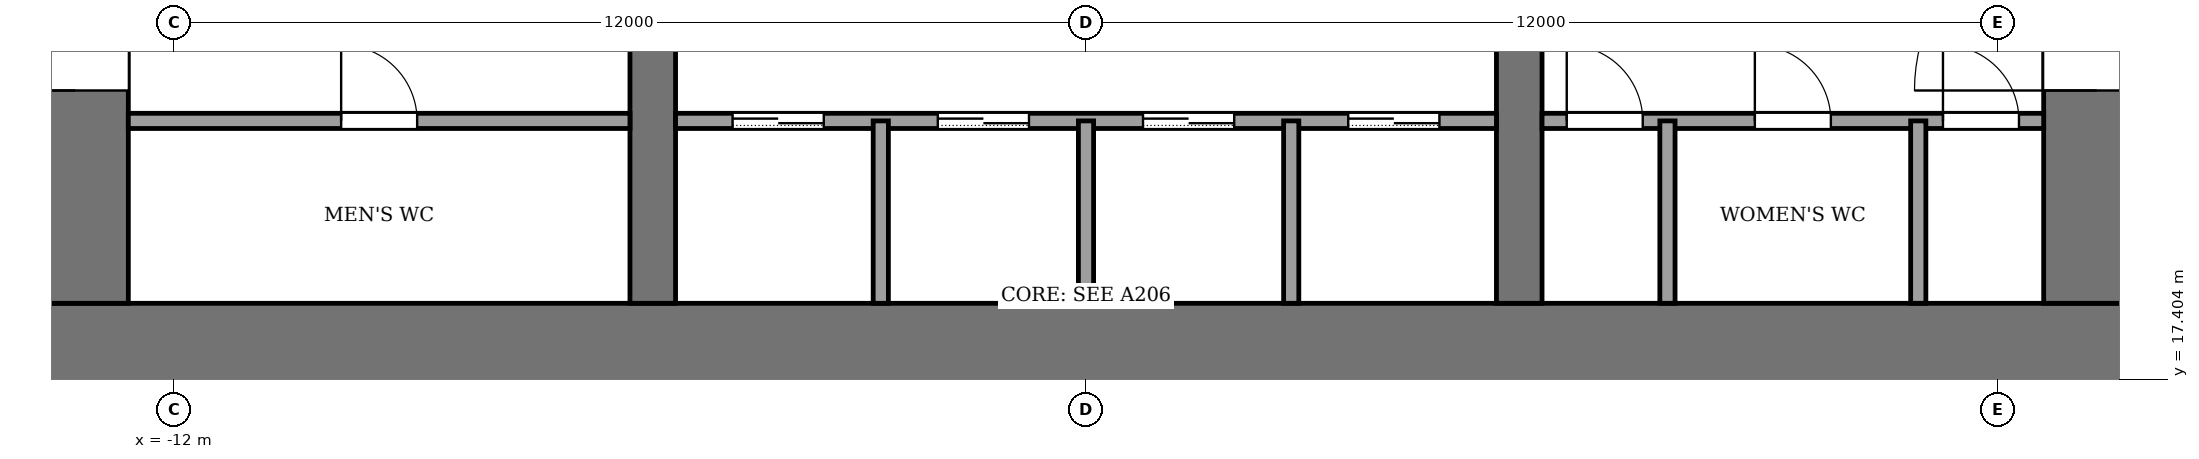
"""IFC4 building model, lengths in metres.
Left out: names, types, materials, properties, quantities, classifications, styles, units other than length and angle.
Written with IfcOpenShell. Run it as: python <this file> out.ifc"""

import sys

from ifc_helpers import new_model, si_unit, direction, frame, frame_2d, origin, place, context, subcontext, project, spatial, rectangle, extrude, element, fill, save


model = new_model("IFC4")
c1 = context("Model", 3, precision=1e-05, world=origin(), true_north=direction((0.0, 1.0)))
c2 = subcontext(c1, "Body", "Model", "MODEL_VIEW")
j1 = project(units=[si_unit("LENGTHUNIT", "METRE"), si_unit("PLANEANGLEUNIT", "RADIAN")], contexts=[c1])
p1 = place(None, origin())
s1 = spatial("IfcSite", under=j1, at=p1, CompositionType="ELEMENT")
p2 = place(p1, origin())
s2 = spatial("IfcBuilding", under=s1, at=p2, CompositionType="ELEMENT")
p3 = place(p2, frame((0.0, 0.0, 26.0)))
s3 = spatial("IfcBuildingStorey", under=s2, at=p3, CompositionType="ELEMENT", Elevation=26.0)
p4 = place(p3, frame((-14.0, 17.7, -0.13), z_axis=(0.0, 0.0, 1.0), x_axis=(1.0, 0.0, 0.0)))
e1 = element("IfcWall", 1, at=p4, inside=s3, PredefinedType="SHEAR", context=c2, shape_type="SweptSolid", body=[
    extrude(rectangle(XDim=28.0, YDim=1.4, at=frame_2d((14.0, 0.0))), origin(), (0.0, 0.0, 1.0), 4.0),
])
p5 = place(p3, frame((-13.3, 18.4, -0.13), z_axis=(0.0, 0.0, 1.0), x_axis=(0.0, 1.0, 0.0)))
e2 = element("IfcWall", 2, at=p5, inside=s3, PredefinedType="SHEAR", context=c2, shape_type="SweptSolid", body=[
    extrude(rectangle(XDim=19.2, YDim=1.4, at=frame_2d((9.6, 0.0))), origin(), (0.0, 0.0, 1.0), 4.0),
])
p6 = place(p5, frame((2.8, 0.0, 0.13)))
e3 = element("IfcOpeningElement", 3, at=p6, cuts=e2, PredefinedType="OPENING", context=c2, shape_type="SweptSolid", body=[
    extrude(rectangle(XDim=2.4, YDim=2.4, at=frame_2d((1.2, 1.2))), frame((0.0, 0.71, 0.0), z_axis=(0.0, -1.0, 0.0), x_axis=(1.0, 0.0, 0.0)), (0.0, 0.0, 1.0), 1.42),
])
p7 = place(p5, frame((13.4, 0.0, 0.13)))
e4 = element("IfcOpeningElement", 4, at=p7, cuts=e2, PredefinedType="OPENING", context=c2, shape_type="SweptSolid", body=[
    extrude(rectangle(XDim=1.4, YDim=2.2, at=frame_2d((0.7, 1.1))), frame((0.0, 0.71, 0.0), z_axis=(0.0, -1.0, 0.0), x_axis=(1.0, 0.0, 0.0)), (0.0, 0.0, 1.0), 1.42),
])
p8 = place(p3, frame((13.3, 18.4, -0.13), z_axis=(0.0, 0.0, 1.0), x_axis=(0.0, 1.0, 0.0)))
e5 = element("IfcWall", 5, at=p8, inside=s3, PredefinedType="SHEAR", context=c2, shape_type="SweptSolid", body=[
    extrude(rectangle(XDim=19.2, YDim=1.4, at=frame_2d((9.6, 0.0))), origin(), (0.0, 0.0, 1.0), 4.0),
])
p9 = place(p8, frame((2.8, 0.0, 0.13)))
e6 = element("IfcOpeningElement", 6, at=p9, cuts=e5, PredefinedType="OPENING", context=c2, shape_type="SweptSolid", body=[
    extrude(rectangle(XDim=2.4, YDim=2.4, at=frame_2d((1.2, 1.2))), frame((0.0, 0.71, 0.0), z_axis=(0.0, -1.0, 0.0), x_axis=(1.0, 0.0, 0.0)), (0.0, 0.0, 1.0), 1.42),
])
p10 = place(p8, frame((13.3, 0.0, 0.13)))
e7 = element("IfcOpeningElement", 7, at=p10, cuts=e5, PredefinedType="OPENING", context=c2, shape_type="SweptSolid", body=[
    extrude(rectangle(XDim=2.4, YDim=2.4, at=frame_2d((1.2, 1.2))), frame((0.0, 0.71, 0.0), z_axis=(0.0, -1.0, 0.0), x_axis=(1.0, 0.0, 0.0)), (0.0, 0.0, 1.0), 1.42),
])
p11 = place(p3, frame((-5.7, 18.4, -0.13), z_axis=(0.0, 0.0, 1.0), x_axis=(0.0, 1.0, 0.0)))
e8 = element("IfcWall", 8, at=p11, inside=s3, PredefinedType="SHEAR", context=c2, shape_type="SweptSolid", body=[
    extrude(rectangle(XDim=19.2, YDim=0.6, at=frame_2d((9.6, 0.0))), origin(), (0.0, 0.0, 1.0), 4.0),
])
p12 = place(p11, frame((8.35, 0.0, 0.13)))
e9 = element("IfcOpeningElement", 9, at=p12, cuts=e8, PredefinedType="OPENING", context=c2, shape_type="SweptSolid", body=[
    extrude(rectangle(XDim=0.9, YDim=2.1, at=frame_2d((0.45, 1.05))), frame((0.0, 0.31, 0.0), z_axis=(0.0, -1.0, 0.0), x_axis=(1.0, 0.0, 0.0)), (0.0, 0.0, 1.0), 0.62),
])
p13 = place(p3, frame((5.7, 18.4, -0.13), z_axis=(0.0, 0.0, 1.0), x_axis=(0.0, 1.0, 0.0)))
e10 = element("IfcWall", 10, at=p13, inside=s3, PredefinedType="SHEAR", context=c2, shape_type="SweptSolid", body=[
    extrude(rectangle(XDim=19.2, YDim=0.6, at=frame_2d((9.6, 0.0))), origin(), (0.0, 0.0, 1.0), 4.0),
])
p14 = place(p13, frame((13.3, 0.0, 0.13)))
e11 = element("IfcOpeningElement", 11, at=p14, cuts=e10, PredefinedType="OPENING", context=c2, shape_type="SweptSolid", body=[
    extrude(rectangle(XDim=2.4, YDim=2.4, at=frame_2d((1.2, 1.2))), frame((0.0, 0.31, 0.0), z_axis=(0.0, -1.0, 0.0), x_axis=(1.0, 0.0, 0.0)), (0.0, 0.0, 1.0), 0.62),
])
p15 = place(p3, frame((-12.6, 20.8, 0.0), z_axis=(0.0, 0.0, 1.0), x_axis=(1.0, 0.0, 0.0)))
e12 = element("IfcWall", 12, at=p15, inside=s3, PredefinedType="PARTITIONING", context=c2, shape_type="SweptSolid", body=[
    extrude(rectangle(XDim=6.6, YDim=0.2, at=frame_2d((3.3, 0.0))), origin(), (0.0, 0.0, 1.0), 3.87),
])
p16 = place(p15, frame((2.8, 0.0, 0.0)))
e13 = element("IfcOpeningElement", 13, at=p16, cuts=e12, PredefinedType="OPENING", context=c2, shape_type="SweptSolid", body=[
    extrude(rectangle(XDim=1.0, YDim=2.1, at=frame_2d((0.5, 1.05))), frame((0.0, 0.11, 0.0), z_axis=(0.0, -1.0, 0.0), x_axis=(1.0, 0.0, 0.0)), (0.0, 0.0, 1.0), 0.22),
])
p17 = place(p3, frame((-5.4, 20.8, 0.0), z_axis=(0.0, 0.0, 1.0), x_axis=(1.0, 0.0, 0.0)))
e14 = element("IfcWall", 14, at=p17, inside=s3, PredefinedType="PARTITIONING", context=c2, shape_type="SweptSolid", body=[
    extrude(rectangle(XDim=10.8, YDim=0.2, at=frame_2d((5.4, 0.0))), origin(), (0.0, 0.0, 1.0), 3.87),
])
p18 = place(p17, frame((0.75, 0.0, 0.0)))
e15 = element("IfcOpeningElement", 15, at=p18, cuts=e14, PredefinedType="OPENING", context=c2, shape_type="SweptSolid", body=[
    extrude(rectangle(XDim=1.2, YDim=2.2, at=frame_2d((0.6, 1.1))), frame((0.0, 0.11, 0.0), z_axis=(0.0, -1.0, 0.0), x_axis=(1.0, 0.0, 0.0)), (0.0, 0.0, 1.0), 0.22),
])
p19 = place(p17, frame((3.45, 0.0, 0.0)))
e16 = element("IfcOpeningElement", 16, at=p19, cuts=e14, PredefinedType="OPENING", context=c2, shape_type="SweptSolid", body=[
    extrude(rectangle(XDim=1.2, YDim=2.2, at=frame_2d((0.6, 1.1))), frame((0.0, 0.11, 0.0), z_axis=(0.0, -1.0, 0.0), x_axis=(1.0, 0.0, 0.0)), (0.0, 0.0, 1.0), 0.22),
])
p20 = place(p17, frame((6.15, 0.0, 0.0)))
e17 = element("IfcOpeningElement", 17, at=p20, cuts=e14, PredefinedType="OPENING", context=c2, shape_type="SweptSolid", body=[
    extrude(rectangle(XDim=1.2, YDim=2.2, at=frame_2d((0.6, 1.1))), frame((0.0, 0.11, 0.0), z_axis=(0.0, -1.0, 0.0), x_axis=(1.0, 0.0, 0.0)), (0.0, 0.0, 1.0), 0.22),
])
p21 = place(p17, frame((8.85, 0.0, 0.0)))
e18 = element("IfcOpeningElement", 18, at=p21, cuts=e14, PredefinedType="OPENING", context=c2, shape_type="SweptSolid", body=[
    extrude(rectangle(XDim=1.2, YDim=2.2, at=frame_2d((0.6, 1.1))), frame((0.0, 0.11, 0.0), z_axis=(0.0, -1.0, 0.0), x_axis=(1.0, 0.0, 0.0)), (0.0, 0.0, 1.0), 0.22),
])
p22 = place(p3, frame((6.0, 20.8, 0.0), z_axis=(0.0, 0.0, 1.0), x_axis=(1.0, 0.0, 0.0)))
e19 = element("IfcWall", 19, at=p22, inside=s3, PredefinedType="PARTITIONING", context=c2, shape_type="SweptSolid", body=[
    extrude(rectangle(XDim=6.6, YDim=0.2, at=frame_2d((3.3, 0.0))), origin(), (0.0, 0.0, 1.0), 3.87),
])
p23 = place(p22, frame((0.325, 0.0, 0.0)))
e20 = element("IfcOpeningElement", 20, at=p23, cuts=e19, PredefinedType="OPENING", context=c2, shape_type="SweptSolid", body=[
    extrude(rectangle(XDim=1.0, YDim=2.1, at=frame_2d((0.5, 1.05))), frame((0.0, 0.11, 0.0), z_axis=(0.0, -1.0, 0.0), x_axis=(1.0, 0.0, 0.0)), (0.0, 0.0, 1.0), 0.22),
])
p24 = place(p22, frame((2.8, 0.0, 0.0)))
e21 = element("IfcOpeningElement", 21, at=p24, cuts=e19, PredefinedType="OPENING", context=c2, shape_type="SweptSolid", body=[
    extrude(rectangle(XDim=1.0, YDim=2.1, at=frame_2d((0.5, 1.05))), frame((0.0, 0.11, 0.0), z_axis=(0.0, -1.0, 0.0), x_axis=(1.0, 0.0, 0.0)), (0.0, 0.0, 1.0), 0.22),
])
p25 = place(p22, frame((5.275, 0.0, 0.0)))
e22 = element("IfcOpeningElement", 22, at=p25, cuts=e19, PredefinedType="OPENING", context=c2, shape_type="SweptSolid", body=[
    extrude(rectangle(XDim=1.0, YDim=2.1, at=frame_2d((0.5, 1.05))), frame((0.0, 0.11, 0.0), z_axis=(0.0, -1.0, 0.0), x_axis=(1.0, 0.0, 0.0)), (0.0, 0.0, 1.0), 0.22),
])
for number, where, z_axis, x_axis in (
    (23, (-2.7, 18.4, 0.0), (0.0, 0.0, 1.0), (0.0, 1.0, 0.0)),
    (24, (0.0, 18.4, 0.0), (0.0, 0.0, 1.0), (0.0, 1.0, 0.0)),
    (25, (2.7, 18.4, 0.0), (0.0, 0.0, 1.0), (0.0, 1.0, 0.0)),
    (26, (7.65, 18.4, 0.0), (0.0, 0.0, 1.0), (0.0, 1.0, 0.0)),
    (27, (10.95, 18.4, 0.0), (0.0, 0.0, 1.0), (0.0, 1.0, 0.0)),
):
    element("IfcWall", number, at=place(p3, frame(where, z_axis=z_axis, x_axis=x_axis)), inside=s3, PredefinedType="PARTITIONING", context=c2, shape_type="SweptSolid", body=[
        extrude(rectangle(XDim=2.4, YDim=0.2, at=frame_2d((1.2, 0.0))), origin(), (0.0, 0.0, 1.0), 3.87),
    ])
p26 = place(p18, origin())
e28 = element("IfcDoor", 28, at=p26, inside=s3, OperationType="SLIDING_TO_LEFT", PredefinedType="DOOR", context=c2, shape_type="SweptSolid", body=[
    extrude(rectangle(XDim=1.2, YDim=2.2, at=frame_2d((0.6, 1.1))), frame((0.0, 0.025, 0.0), z_axis=(0.0, -1.0, 0.0), x_axis=(1.0, 0.0, 0.0)), (0.0, 0.0, 1.0), 0.05),
])
fill(e15, e28)
p27 = place(p19, origin())
e29 = element("IfcDoor", 29, at=p27, inside=s3, OperationType="SLIDING_TO_LEFT", PredefinedType="DOOR", context=c2, shape_type="SweptSolid", body=[
    extrude(rectangle(XDim=1.2, YDim=2.2, at=frame_2d((0.6, 1.1))), frame((0.0, 0.025, 0.0), z_axis=(0.0, -1.0, 0.0), x_axis=(1.0, 0.0, 0.0)), (0.0, 0.0, 1.0), 0.05),
])
fill(e16, e29)
p28 = place(p20, origin())
e30 = element("IfcDoor", 30, at=p28, inside=s3, OperationType="SLIDING_TO_LEFT", PredefinedType="DOOR", context=c2, shape_type="SweptSolid", body=[
    extrude(rectangle(XDim=1.2, YDim=2.2, at=frame_2d((0.6, 1.1))), frame((0.0, 0.025, 0.0), z_axis=(0.0, -1.0, 0.0), x_axis=(1.0, 0.0, 0.0)), (0.0, 0.0, 1.0), 0.05),
])
fill(e17, e30)
p29 = place(p21, origin())
e31 = element("IfcDoor", 31, at=p29, inside=s3, OperationType="SLIDING_TO_LEFT", PredefinedType="DOOR", context=c2, shape_type="SweptSolid", body=[
    extrude(rectangle(XDim=1.2, YDim=2.2, at=frame_2d((0.6, 1.1))), frame((0.0, 0.025, 0.0), z_axis=(0.0, -1.0, 0.0), x_axis=(1.0, 0.0, 0.0)), (0.0, 0.0, 1.0), 0.05),
])
fill(e18, e31)
p30 = place(p16, origin())
e32 = element("IfcDoor", 32, at=p30, inside=s3, OperationType="SINGLE_SWING_LEFT", PredefinedType="DOOR", context=c2, shape_type="SweptSolid", body=[
    extrude(rectangle(XDim=1.0, YDim=2.1, at=frame_2d((0.5, 1.05))), frame((0.0, 0.025, 0.0), z_axis=(0.0, -1.0, 0.0), x_axis=(1.0, 0.0, 0.0)), (0.0, 0.0, 1.0), 0.05),
])
fill(e13, e32)
p31 = place(p23, origin())
e33 = element("IfcDoor", 33, at=p31, inside=s3, OperationType="SINGLE_SWING_LEFT", PredefinedType="DOOR", context=c2, shape_type="SweptSolid", body=[
    extrude(rectangle(XDim=1.0, YDim=2.1, at=frame_2d((0.5, 1.05))), frame((0.0, 0.025, 0.0), z_axis=(0.0, -1.0, 0.0), x_axis=(1.0, 0.0, 0.0)), (0.0, 0.0, 1.0), 0.05),
])
fill(e20, e33)
p32 = place(p24, origin())
e34 = element("IfcDoor", 34, at=p32, inside=s3, OperationType="SINGLE_SWING_LEFT", PredefinedType="DOOR", context=c2, shape_type="SweptSolid", body=[
    extrude(rectangle(XDim=1.0, YDim=2.1, at=frame_2d((0.5, 1.05))), frame((0.0, 0.025, 0.0), z_axis=(0.0, -1.0, 0.0), x_axis=(1.0, 0.0, 0.0)), (0.0, 0.0, 1.0), 0.05),
])
fill(e21, e34)
p33 = place(p25, origin())
e35 = element("IfcDoor", 35, at=p33, inside=s3, OperationType="SINGLE_SWING_LEFT", PredefinedType="DOOR", context=c2, shape_type="SweptSolid", body=[
    extrude(rectangle(XDim=1.0, YDim=2.1, at=frame_2d((0.5, 1.05))), frame((0.0, 0.025, 0.0), z_axis=(0.0, -1.0, 0.0), x_axis=(1.0, 0.0, 0.0)), (0.0, 0.0, 1.0), 0.05),
])
fill(e22, e35)
p34 = place(p6, origin())
e36 = element("IfcDoor", 36, at=p34, inside=s3, OperationType="DOUBLE_DOOR_SINGLE_SWING", PredefinedType="DOOR", context=c2, shape_type="SweptSolid", body=[
    extrude(rectangle(XDim=2.4, YDim=2.4, at=frame_2d((1.2, 1.2))), frame((0.0, 0.025, 0.0), z_axis=(0.0, -1.0, 0.0), x_axis=(1.0, 0.0, 0.0)), (0.0, 0.0, 1.0), 0.05),
])
fill(e3, e36)
p35 = place(p9, origin())
e37 = element("IfcDoor", 37, at=p35, inside=s3, OperationType="DOUBLE_DOOR_SINGLE_SWING", PredefinedType="DOOR", context=c2, shape_type="SweptSolid", body=[
    extrude(rectangle(XDim=2.4, YDim=2.4, at=frame_2d((1.2, 1.2))), frame((0.0, 0.025, 0.0), z_axis=(0.0, -1.0, 0.0), x_axis=(1.0, 0.0, 0.0)), (0.0, 0.0, 1.0), 0.05),
])
fill(e6, e37)
save(model, sys.argv[1])
